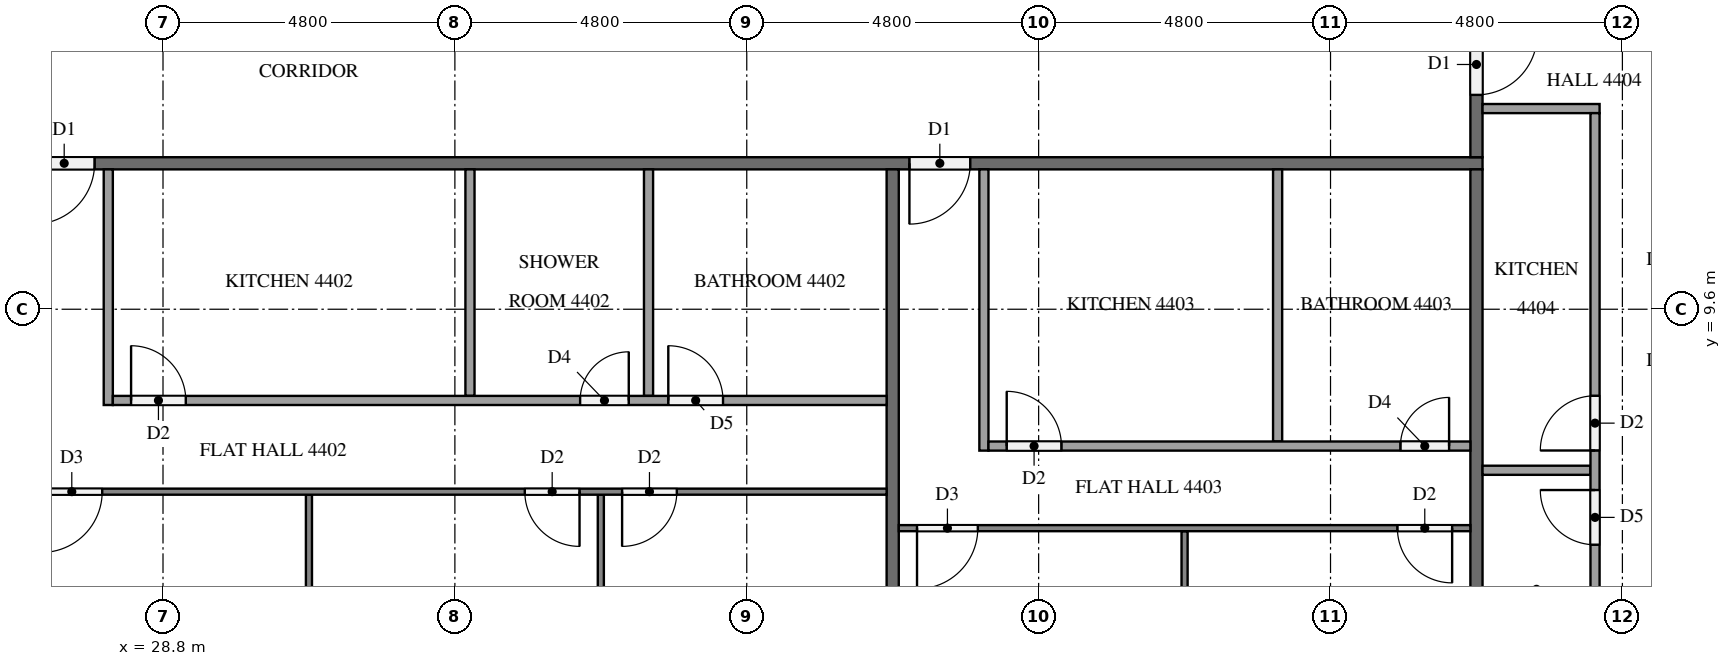
"""IFC4 building model, lengths in metres.
Left out: names, types, materials, properties, quantities, classifications, styles, units other than length and angle.
Written with IfcOpenShell. Run it as: python <this file> out.ifc"""

import sys

from ifc_helpers import new_model, si_unit, direction, frame, frame_2d, origin, place, context, subcontext, project, spatial, rectangle, extrude, element, fill, save


model = new_model("IFC4")
c1 = context("Model", 3, precision=1e-05, world=origin(), true_north=direction((0.0, 1.0)))
c2 = subcontext(c1, "Body", "Model", "MODEL_VIEW")
j1 = project(units=[si_unit("LENGTHUNIT", "METRE"), si_unit("PLANEANGLEUNIT", "RADIAN")], contexts=[c1])
p1 = place(None, origin())
s1 = spatial("IfcSite", under=j1, at=p1, CompositionType="ELEMENT")
p2 = place(p1, origin())
s2 = spatial("IfcBuilding", under=s1, at=p2, CompositionType="ELEMENT")
p3 = place(p2, frame((0.0, 0.0, 170.0)))
s3 = spatial("IfcBuildingStorey", under=s2, at=p3, CompositionType="ELEMENT", Elevation=170.0)
p4 = place(p3, frame((50.5, 12.0, 0.0), z_axis=(0.0, 0.0, 1.0), x_axis=(-1.0, 0.0, 0.0)))
e1 = element("IfcWall", 1, at=p4, inside=s3, PredefinedType="PARTITIONING", context=c2, shape_type="SweptSolid", body=[
    extrude(rectangle(XDim=38.6, YDim=0.2, at=frame_2d((19.3, 0.0))), origin(), (0.0, 0.0, 1.0), 3.1),
])
p5 = place(p4, frame((37.225, 0.0, 0.0)))
e2 = element("IfcOpeningElement", 2, at=p5, cuts=e1, PredefinedType="OPENING", context=c2, shape_type="SweptSolid", body=[
    extrude(rectangle(XDim=1.0, YDim=2.1, at=frame_2d((0.5, 1.05))), frame((0.0, 0.11, 0.0), z_axis=(0.0, -1.0, 0.0), x_axis=(1.0, 0.0, 0.0)), (0.0, 0.0, 1.0), 0.22),
])
p6 = place(p4, frame((22.825, 0.0, 0.0)))
e3 = element("IfcOpeningElement", 3, at=p6, cuts=e1, PredefinedType="OPENING", context=c2, shape_type="SweptSolid", body=[
    extrude(rectangle(XDim=1.0, YDim=2.1, at=frame_2d((0.5, 1.05))), frame((0.0, 0.11, 0.0), z_axis=(0.0, -1.0, 0.0), x_axis=(1.0, 0.0, 0.0)), (0.0, 0.0, 1.0), 0.22),
])
p7 = place(p4, frame((8.425, 0.0, 0.0)))
e4 = element("IfcOpeningElement", 4, at=p7, cuts=e1, PredefinedType="OPENING", context=c2, shape_type="SweptSolid", body=[
    extrude(rectangle(XDim=1.0, YDim=2.1, at=frame_2d((0.5, 1.05))), frame((0.0, 0.11, 0.0), z_axis=(0.0, -1.0, 0.0), x_axis=(1.0, 0.0, 0.0)), (0.0, 0.0, 1.0), 0.22),
])
p8 = place(p3, frame((50.4, 40.7, 0.0), z_axis=(0.0, 0.0, 1.0), x_axis=(0.0, -1.0, 0.0)))
e5 = element("IfcWall", 5, at=p8, inside=s3, PredefinedType="PARTITIONING", context=c2, shape_type="SweptSolid", body=[
    extrude(rectangle(XDim=28.6, YDim=0.2, at=frame_2d((14.3, 0.0))), origin(), (0.0, 0.0, 1.0), 3.1),
])
p9 = place(p8, frame((26.575, 0.0, 0.0)))
e6 = element("IfcOpeningElement", 6, at=p9, cuts=e5, PredefinedType="OPENING", context=c2, shape_type="SweptSolid", body=[
    extrude(rectangle(XDim=1.0, YDim=2.1, at=frame_2d((0.5, 1.05))), frame((0.0, 0.11, 0.0), z_axis=(0.0, -1.0, 0.0), x_axis=(1.0, 0.0, 0.0)), (0.0, 0.0, 1.0), 0.22),
])
p10 = place(p8, frame((25.025, 0.0, 0.0)))
e7 = element("IfcOpeningElement", 7, at=p10, cuts=e5, PredefinedType="OPENING", context=c2, shape_type="SweptSolid", body=[
    extrude(rectangle(XDim=1.0, YDim=2.1, at=frame_2d((0.5, 1.05))), frame((0.0, 0.11, 0.0), z_axis=(0.0, -1.0, 0.0), x_axis=(1.0, 0.0, 0.0)), (0.0, 0.0, 1.0), 0.22),
])
p11 = place(p8, frame((4.975, 0.0, 0.0)))
e8 = element("IfcOpeningElement", 8, at=p11, cuts=e5, PredefinedType="OPENING", context=c2, shape_type="SweptSolid", body=[
    extrude(rectangle(XDim=1.0, YDim=2.1, at=frame_2d((0.5, 1.05))), frame((0.0, 0.11, 0.0), z_axis=(0.0, -1.0, 0.0), x_axis=(1.0, 0.0, 0.0)), (0.0, 0.0, 1.0), 0.22),
])
p12 = place(p8, frame((3.425, 0.0, 0.0)))
e9 = element("IfcOpeningElement", 9, at=p12, cuts=e5, PredefinedType="OPENING", context=c2, shape_type="SweptSolid", body=[
    extrude(rectangle(XDim=1.0, YDim=2.1, at=frame_2d((0.5, 1.05))), frame((0.0, 0.11, 0.0), z_axis=(0.0, -1.0, 0.0), x_axis=(1.0, 0.0, 0.0)), (0.0, 0.0, 1.0), 0.22),
])
for number, where, z_axis, x_axis in (
    (10, (40.8, 11.9, 0.0), (0.0, 0.0, 1.0), (0.0, -1.0, 0.0)),
    (11, (50.4, 11.9, 0.0), (0.0, 0.0, 1.0), (0.0, -1.0, 0.0)),
):
    element("IfcWall", number, at=place(p3, frame(where, z_axis=z_axis, x_axis=x_axis)), inside=s3, PredefinedType="PARTITIONING", context=c2, shape_type="SweptSolid", body=[
        extrude(rectangle(XDim=11.8, YDim=0.2, at=frame_2d((5.9, 0.0))), origin(), (0.0, 0.0, 1.0), 3.1),
    ])
for number, where, z_axis, x_axis in (
    (12, (31.2, 6.55, 0.0), (0.0, 0.0, 1.0), (0.0, -1.0, 0.0)),
    (13, (36.0, 6.55, 0.0), (0.0, 0.0, 1.0), (0.0, -1.0, 0.0)),
):
    element("IfcWall", number, at=place(p3, frame(where, z_axis=z_axis, x_axis=x_axis)), inside=s3, PredefinedType="PARTITIONING", context=c2, shape_type="SweptSolid", body=[
        extrude(rectangle(XDim=6.45, YDim=0.1, at=frame_2d((3.225, 0.0))), origin(), (0.0, 0.0, 1.0), 3.1),
    ])
p13 = place(p3, frame((40.7, 6.6, 0.0), z_axis=(0.0, 0.0, 1.0), x_axis=(-1.0, 0.0, 0.0)))
e14 = element("IfcWall", 14, at=p13, inside=s3, PredefinedType="PARTITIONING", context=c2, shape_type="SweptSolid", body=[
    extrude(rectangle(XDim=14.2, YDim=0.1, at=frame_2d((7.1, 0.0))), origin(), (0.0, 0.0, 1.0), 3.1),
])
p14 = place(p13, frame((12.9, 0.0, 0.0)))
e15 = element("IfcOpeningElement", 15, at=p14, cuts=e14, PredefinedType="OPENING", context=c2, shape_type="SweptSolid", body=[
    extrude(rectangle(XDim=1.0, YDim=2.1, at=frame_2d((0.5, 1.05))), frame((0.0, 0.06, 0.0), z_axis=(0.0, -1.0, 0.0), x_axis=(1.0, 0.0, 0.0)), (0.0, 0.0, 1.0), 0.12),
])
p15 = place(p13, frame((5.05, 0.0, 0.0)))
e16 = element("IfcOpeningElement", 16, at=p15, cuts=e14, PredefinedType="OPENING", context=c2, shape_type="SweptSolid", body=[
    extrude(rectangle(XDim=0.9, YDim=2.1, at=frame_2d((0.45, 1.05))), frame((0.0, 0.06, 0.0), z_axis=(0.0, -1.0, 0.0), x_axis=(1.0, 0.0, 0.0)), (0.0, 0.0, 1.0), 0.12),
])
p16 = place(p13, frame((3.45, 0.0, 0.0)))
e17 = element("IfcOpeningElement", 17, at=p16, cuts=e14, PredefinedType="OPENING", context=c2, shape_type="SweptSolid", body=[
    extrude(rectangle(XDim=0.9, YDim=2.1, at=frame_2d((0.45, 1.05))), frame((0.0, 0.06, 0.0), z_axis=(0.0, -1.0, 0.0), x_axis=(1.0, 0.0, 0.0)), (0.0, 0.0, 1.0), 0.12),
])
for number, where, z_axis, x_axis in (
    (18, (33.848, 11.9, 0.0), (0.0, 0.0, 1.0), (0.0, -1.0, 0.0)),
    (19, (36.785, 11.9, 0.0), (0.0, 0.0, 1.0), (0.0, -1.0, 0.0)),
):
    element("IfcWall", number, at=place(p3, frame(where, z_axis=z_axis, x_axis=x_axis)), inside=s3, PredefinedType="PARTITIONING", context=c2, shape_type="SweptSolid", body=[
        extrude(rectangle(XDim=3.725, YDim=0.15, at=frame_2d((1.862, 0.0))), origin(), (0.0, 0.0, 1.0), 3.1),
    ])
p17 = place(p3, frame((27.9, 11.9, 0.0), z_axis=(0.0, 0.0, 1.0), x_axis=(0.0, -1.0, 0.0)))
e20 = element("IfcWall", 20, at=p17, inside=s3, PredefinedType="PARTITIONING", context=c2, shape_type="SweptSolid", body=[
    extrude(rectangle(XDim=3.875, YDim=0.15, at=frame_2d((1.938, 0.0))), origin(), (0.0, 0.0, 1.0), 3.1),
])
p18 = place(p3, frame((27.975, 8.1, 0.0), z_axis=(0.0, 0.0, 1.0), x_axis=(1.0, 0.0, 0.0)))
e21 = element("IfcWall", 21, at=p18, inside=s3, PredefinedType="PARTITIONING", context=c2, shape_type="SweptSolid", body=[
    extrude(rectangle(XDim=12.725, YDim=0.15, at=frame_2d((6.362, 0.0))), origin(), (0.0, 0.0, 1.0), 3.1),
])
p19 = place(p18, frame((0.3, 0.0, 0.0)))
e22 = element("IfcOpeningElement", 22, at=p19, cuts=e21, PredefinedType="OPENING", context=c2, shape_type="SweptSolid", body=[
    extrude(rectangle(XDim=0.9, YDim=2.1, at=frame_2d((0.45, 1.05))), frame((0.0, 0.085, 0.0), z_axis=(0.0, -1.0, 0.0), x_axis=(1.0, 0.0, 0.0)), (0.0, 0.0, 1.0), 0.17),
])
p20 = place(p18, frame((7.685, 0.0, 0.0)))
e23 = element("IfcOpeningElement", 23, at=p20, cuts=e21, PredefinedType="OPENING", context=c2, shape_type="SweptSolid", body=[
    extrude(rectangle(XDim=0.8, YDim=2.1, at=frame_2d((0.4, 1.05))), frame((0.0, 0.085, 0.0), z_axis=(0.0, -1.0, 0.0), x_axis=(1.0, 0.0, 0.0)), (0.0, 0.0, 1.0), 0.17),
])
p21 = place(p18, frame((9.135, 0.0, 0.0)))
e24 = element("IfcOpeningElement", 24, at=p21, cuts=e21, PredefinedType="OPENING", context=c2, shape_type="SweptSolid", body=[
    extrude(rectangle(XDim=0.9, YDim=2.1, at=frame_2d((0.45, 1.05))), frame((0.0, 0.085, 0.0), z_axis=(0.0, -1.0, 0.0), x_axis=(1.0, 0.0, 0.0)), (0.0, 0.0, 1.0), 0.17),
])
p22 = place(p3, frame((45.6, 5.95, 0.0), z_axis=(0.0, 0.0, 1.0), x_axis=(0.0, -1.0, 0.0)))
e25 = element("IfcWall", 25, at=p22, inside=s3, PredefinedType="PARTITIONING", context=c2, shape_type="SweptSolid", body=[
    extrude(rectangle(XDim=5.85, YDim=0.1, at=frame_2d((2.925, 0.0))), origin(), (0.0, 0.0, 1.0), 3.1),
])
p23 = place(p3, frame((50.3, 6.0, 0.0), z_axis=(0.0, 0.0, 1.0), x_axis=(-1.0, 0.0, 0.0)))
e26 = element("IfcWall", 26, at=p23, inside=s3, PredefinedType="PARTITIONING", context=c2, shape_type="SweptSolid", body=[
    extrude(rectangle(XDim=9.4, YDim=0.1, at=frame_2d((4.7, 0.0))), origin(), (0.0, 0.0, 1.0), 3.1),
])
p24 = place(p23, frame((8.1, 0.0, 0.0)))
e27 = element("IfcOpeningElement", 27, at=p24, cuts=e26, PredefinedType="OPENING", context=c2, shape_type="SweptSolid", body=[
    extrude(rectangle(XDim=1.0, YDim=2.1, at=frame_2d((0.5, 1.05))), frame((0.0, 0.06, 0.0), z_axis=(0.0, -1.0, 0.0), x_axis=(1.0, 0.0, 0.0)), (0.0, 0.0, 1.0), 0.12),
])
p25 = place(p23, frame((0.3, 0.0, 0.0)))
e28 = element("IfcOpeningElement", 28, at=p25, cuts=e26, PredefinedType="OPENING", context=c2, shape_type="SweptSolid", body=[
    extrude(rectangle(XDim=0.9, YDim=2.1, at=frame_2d((0.45, 1.05))), frame((0.0, 0.06, 0.0), z_axis=(0.0, -1.0, 0.0), x_axis=(1.0, 0.0, 0.0)), (0.0, 0.0, 1.0), 0.12),
])
p26 = place(p3, frame((47.13, 11.9, 0.0), z_axis=(0.0, 0.0, 1.0), x_axis=(0.0, -1.0, 0.0)))
e29 = element("IfcWall", 29, at=p26, inside=s3, PredefinedType="PARTITIONING", context=c2, shape_type="SweptSolid", body=[
    extrude(rectangle(XDim=4.475, YDim=0.15, at=frame_2d((2.237, 0.0))), origin(), (0.0, 0.0, 1.0), 3.1),
])
p27 = place(p3, frame((42.3, 11.9, 0.0), z_axis=(0.0, 0.0, 1.0), x_axis=(0.0, -1.0, 0.0)))
e30 = element("IfcWall", 30, at=p27, inside=s3, PredefinedType="PARTITIONING", context=c2, shape_type="SweptSolid", body=[
    extrude(rectangle(XDim=4.625, YDim=0.15, at=frame_2d((2.312, 0.0))), origin(), (0.0, 0.0, 1.0), 3.1),
])
p28 = place(p3, frame((42.375, 7.35, 0.0), z_axis=(0.0, 0.0, 1.0), x_axis=(1.0, 0.0, 0.0)))
e31 = element("IfcWall", 31, at=p28, inside=s3, PredefinedType="PARTITIONING", context=c2, shape_type="SweptSolid", body=[
    extrude(rectangle(XDim=7.925, YDim=0.15, at=frame_2d((3.962, 0.0))), origin(), (0.0, 0.0, 1.0), 3.1),
])
p29 = place(p28, frame((0.3, 0.0, 0.0)))
e32 = element("IfcOpeningElement", 32, at=p29, cuts=e31, PredefinedType="OPENING", context=c2, shape_type="SweptSolid", body=[
    extrude(rectangle(XDim=0.9, YDim=2.1, at=frame_2d((0.45, 1.05))), frame((0.0, 0.085, 0.0), z_axis=(0.0, -1.0, 0.0), x_axis=(1.0, 0.0, 0.0)), (0.0, 0.0, 1.0), 0.17),
])
p30 = place(p28, frame((6.775, 0.0, 0.0)))
e33 = element("IfcOpeningElement", 33, at=p30, cuts=e31, PredefinedType="OPENING", context=c2, shape_type="SweptSolid", body=[
    extrude(rectangle(XDim=0.8, YDim=2.1, at=frame_2d((0.4, 1.05))), frame((0.0, 0.085, 0.0), z_axis=(0.0, -1.0, 0.0), x_axis=(1.0, 0.0, 0.0)), (0.0, 0.0, 1.0), 0.17),
])
p31 = place(p3, frame((50.5, 6.952, 0.0), z_axis=(0.0, 0.0, 1.0), x_axis=(1.0, 0.0, 0.0)))
e34 = element("IfcWall", 34, at=p31, inside=s3, PredefinedType="PARTITIONING", context=c2, shape_type="SweptSolid", body=[
    extrude(rectangle(XDim=1.775, YDim=0.15, at=frame_2d((0.887, 0.0))), origin(), (0.0, 0.0, 1.0), 3.1),
])
p32 = place(p3, frame((50.5, 12.9, 0.0), z_axis=(0.0, 0.0, 1.0), x_axis=(1.0, 0.0, 0.0)))
e35 = element("IfcWall", 35, at=p32, inside=s3, PredefinedType="PARTITIONING", context=c2, shape_type="SweptSolid", body=[
    extrude(rectangle(XDim=1.925, YDim=0.15, at=frame_2d((0.962, 0.0))), origin(), (0.0, 0.0, 1.0), 3.1),
])
p33 = place(p3, frame((52.35, 0.525, 0.0), z_axis=(0.0, 0.0, 1.0), x_axis=(0.0, 1.0, 0.0)))
e36 = element("IfcWall", 36, at=p33, inside=s3, PredefinedType="PARTITIONING", context=c2, shape_type="SweptSolid", body=[
    extrude(rectangle(XDim=12.3, YDim=0.15, at=frame_2d((6.15, 0.0))), origin(), (0.0, 0.0, 1.0), 3.1),
])
p34 = place(p33, frame((6.752, 0.0, 0.0)))
e37 = element("IfcOpeningElement", 37, at=p34, cuts=e36, PredefinedType="OPENING", context=c2, shape_type="SweptSolid", body=[
    extrude(rectangle(XDim=0.9, YDim=2.1, at=frame_2d((0.45, 1.05))), frame((0.0, 0.085, 0.0), z_axis=(0.0, -1.0, 0.0), x_axis=(1.0, 0.0, 0.0)), (0.0, 0.0, 1.0), 0.17),
])
p35 = place(p33, frame((5.202, 0.0, 0.0)))
e38 = element("IfcOpeningElement", 38, at=p35, cuts=e36, PredefinedType="OPENING", context=c2, shape_type="SweptSolid", body=[
    extrude(rectangle(XDim=0.9, YDim=2.1, at=frame_2d((0.45, 1.05))), frame((0.0, 0.085, 0.0), z_axis=(0.0, -1.0, 0.0), x_axis=(1.0, 0.0, 0.0)), (0.0, 0.0, 1.0), 0.17),
])
p36 = place(p33, frame((0.3, 0.0, 0.0)))
e39 = element("IfcOpeningElement", 39, at=p36, cuts=e36, PredefinedType="OPENING", context=c2, shape_type="SweptSolid", body=[
    extrude(rectangle(XDim=0.8, YDim=2.1, at=frame_2d((0.4, 1.05))), frame((0.0, 0.085, 0.0), z_axis=(0.0, -1.0, 0.0), x_axis=(1.0, 0.0, 0.0)), (0.0, 0.0, 1.0), 0.17),
])
p37 = place(p6, origin())
e40 = element("IfcDoor", 40, at=p37, inside=s3, OperationType="SINGLE_SWING_RIGHT", PredefinedType="DOOR", context=c2, shape_type="SweptSolid", body=[
    extrude(rectangle(XDim=1.0, YDim=2.1, at=frame_2d((0.5, 1.05))), frame((0.0, 0.025, 0.0), z_axis=(0.0, -1.0, 0.0), x_axis=(1.0, 0.0, 0.0)), (0.0, 0.0, 1.0), 0.05),
])
fill(e3, e40)
p38 = place(p7, origin())
e41 = element("IfcDoor", 41, at=p38, inside=s3, OperationType="SINGLE_SWING_RIGHT", PredefinedType="DOOR", context=c2, shape_type="SweptSolid", body=[
    extrude(rectangle(XDim=1.0, YDim=2.1, at=frame_2d((0.5, 1.05))), frame((0.0, 0.025, 0.0), z_axis=(0.0, -1.0, 0.0), x_axis=(1.0, 0.0, 0.0)), (0.0, 0.0, 1.0), 0.05),
])
fill(e4, e41)
p39 = place(p9, origin())
e42 = element("IfcDoor", 42, at=p39, inside=s3, OperationType="SINGLE_SWING_LEFT", PredefinedType="DOOR", context=c2, shape_type="SweptSolid", body=[
    extrude(rectangle(XDim=1.0, YDim=2.1, at=frame_2d((0.5, 1.05))), frame((0.0, 0.025, 0.0), z_axis=(0.0, -1.0, 0.0), x_axis=(1.0, 0.0, 0.0)), (0.0, 0.0, 1.0), 0.05),
])
fill(e6, e42)
p40 = place(p14, origin())
e43 = element("IfcDoor", 43, at=p40, inside=s3, OperationType="SINGLE_SWING_RIGHT", PredefinedType="DOOR", context=c2, shape_type="SweptSolid", body=[
    extrude(rectangle(XDim=1.0, YDim=2.1, at=frame_2d((0.5, 1.05))), frame((0.0, 0.025, 0.0), z_axis=(0.0, -1.0, 0.0), x_axis=(1.0, 0.0, 0.0)), (0.0, 0.0, 1.0), 0.05),
])
fill(e15, e43)
p41 = place(p15, origin())
e44 = element("IfcDoor", 44, at=p41, inside=s3, OperationType="SINGLE_SWING_LEFT", PredefinedType="DOOR", context=c2, shape_type="SweptSolid", body=[
    extrude(rectangle(XDim=0.9, YDim=2.1, at=frame_2d((0.45, 1.05))), frame((0.0, 0.025, 0.0), z_axis=(0.0, -1.0, 0.0), x_axis=(1.0, 0.0, 0.0)), (0.0, 0.0, 1.0), 0.05),
])
fill(e16, e44)
p42 = place(p16, origin())
e45 = element("IfcDoor", 45, at=p42, inside=s3, OperationType="SINGLE_SWING_RIGHT", PredefinedType="DOOR", context=c2, shape_type="SweptSolid", body=[
    extrude(rectangle(XDim=0.9, YDim=2.1, at=frame_2d((0.45, 1.05))), frame((0.0, 0.025, 0.0), z_axis=(0.0, -1.0, 0.0), x_axis=(1.0, 0.0, 0.0)), (0.0, 0.0, 1.0), 0.05),
])
fill(e17, e45)
p43 = place(p19, origin())
e46 = element("IfcDoor", 46, at=p43, inside=s3, OperationType="SINGLE_SWING_LEFT", PredefinedType="DOOR", context=c2, shape_type="SweptSolid", body=[
    extrude(rectangle(XDim=0.9, YDim=2.1, at=frame_2d((0.45, 1.05))), frame((0.0, 0.025, 0.0), z_axis=(0.0, -1.0, 0.0), x_axis=(1.0, 0.0, 0.0)), (0.0, 0.0, 1.0), 0.05),
])
fill(e22, e46)
p44 = place(p20, origin())
e47 = element("IfcDoor", 47, at=p44, inside=s3, OperationType="SINGLE_SWING_RIGHT", PredefinedType="DOOR", context=c2, shape_type="SweptSolid", body=[
    extrude(rectangle(XDim=0.8, YDim=2.1, at=frame_2d((0.4, 1.05))), frame((0.0, 0.025, 0.0), z_axis=(0.0, -1.0, 0.0), x_axis=(1.0, 0.0, 0.0)), (0.0, 0.0, 1.0), 0.05),
])
fill(e23, e47)
p45 = place(p21, origin())
e48 = element("IfcDoor", 48, at=p45, inside=s3, OperationType="SINGLE_SWING_LEFT", PredefinedType="DOOR", context=c2, shape_type="SweptSolid", body=[
    extrude(rectangle(XDim=0.9, YDim=2.1, at=frame_2d((0.45, 1.05))), frame((0.0, 0.025, 0.0), z_axis=(0.0, -1.0, 0.0), x_axis=(1.0, 0.0, 0.0)), (0.0, 0.0, 1.0), 0.05),
])
fill(e24, e48)
p46 = place(p24, origin())
e49 = element("IfcDoor", 49, at=p46, inside=s3, OperationType="SINGLE_SWING_RIGHT", PredefinedType="DOOR", context=c2, shape_type="SweptSolid", body=[
    extrude(rectangle(XDim=1.0, YDim=2.1, at=frame_2d((0.5, 1.05))), frame((0.0, 0.025, 0.0), z_axis=(0.0, -1.0, 0.0), x_axis=(1.0, 0.0, 0.0)), (0.0, 0.0, 1.0), 0.05),
])
fill(e27, e49)
p47 = place(p25, origin())
e50 = element("IfcDoor", 50, at=p47, inside=s3, OperationType="SINGLE_SWING_LEFT", PredefinedType="DOOR", context=c2, shape_type="SweptSolid", body=[
    extrude(rectangle(XDim=0.9, YDim=2.1, at=frame_2d((0.45, 1.05))), frame((0.0, 0.025, 0.0), z_axis=(0.0, -1.0, 0.0), x_axis=(1.0, 0.0, 0.0)), (0.0, 0.0, 1.0), 0.05),
])
fill(e28, e50)
p48 = place(p29, origin())
e51 = element("IfcDoor", 51, at=p48, inside=s3, OperationType="SINGLE_SWING_LEFT", PredefinedType="DOOR", context=c2, shape_type="SweptSolid", body=[
    extrude(rectangle(XDim=0.9, YDim=2.1, at=frame_2d((0.45, 1.05))), frame((0.0, 0.025, 0.0), z_axis=(0.0, -1.0, 0.0), x_axis=(1.0, 0.0, 0.0)), (0.0, 0.0, 1.0), 0.05),
])
fill(e32, e51)
p49 = place(p30, origin())
e52 = element("IfcDoor", 52, at=p49, inside=s3, OperationType="SINGLE_SWING_RIGHT", PredefinedType="DOOR", context=c2, shape_type="SweptSolid", body=[
    extrude(rectangle(XDim=0.8, YDim=2.1, at=frame_2d((0.4, 1.05))), frame((0.0, 0.025, 0.0), z_axis=(0.0, -1.0, 0.0), x_axis=(1.0, 0.0, 0.0)), (0.0, 0.0, 1.0), 0.05),
])
fill(e33, e52)
p50 = place(p34, origin())
e53 = element("IfcDoor", 53, at=p50, inside=s3, OperationType="SINGLE_SWING_LEFT", PredefinedType="DOOR", context=c2, shape_type="SweptSolid", body=[
    extrude(rectangle(XDim=0.9, YDim=2.1, at=frame_2d((0.45, 1.05))), frame((0.0, 0.025, 0.0), z_axis=(0.0, -1.0, 0.0), x_axis=(1.0, 0.0, 0.0)), (0.0, 0.0, 1.0), 0.05),
])
fill(e37, e53)
p51 = place(p35, origin())
e54 = element("IfcDoor", 54, at=p51, inside=s3, OperationType="SINGLE_SWING_RIGHT", PredefinedType="DOOR", context=c2, shape_type="SweptSolid", body=[
    extrude(rectangle(XDim=0.9, YDim=2.1, at=frame_2d((0.45, 1.05))), frame((0.0, 0.025, 0.0), z_axis=(0.0, -1.0, 0.0), x_axis=(1.0, 0.0, 0.0)), (0.0, 0.0, 1.0), 0.05),
])
fill(e38, e54)
save(model, sys.argv[1])
